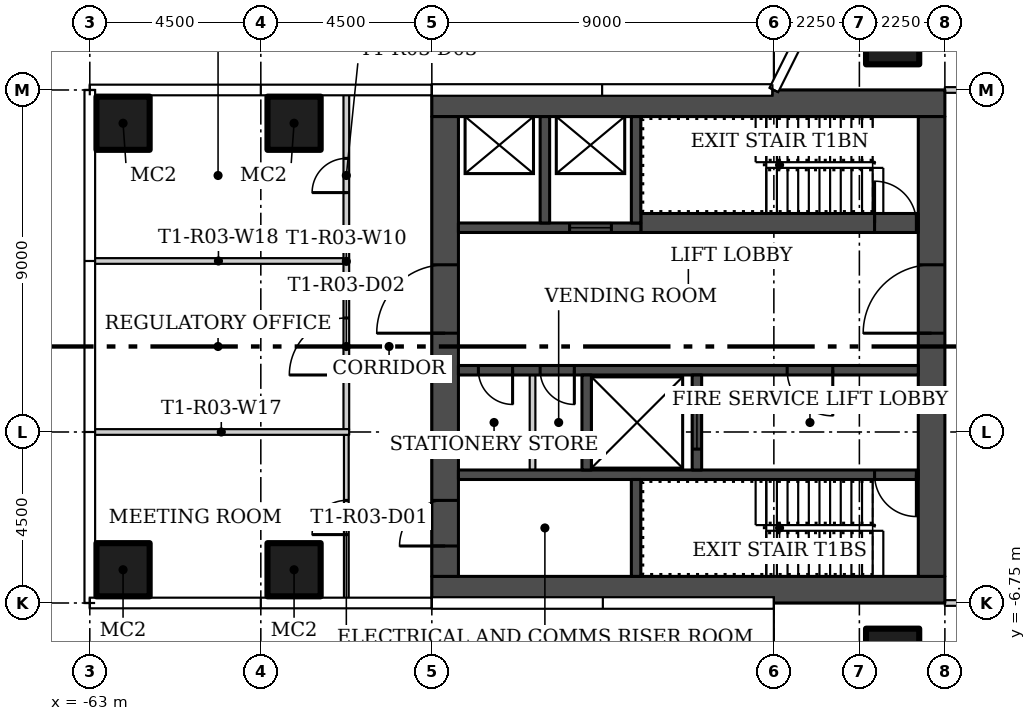
"""IFC4 building model, lengths in metres.
Left out: names, types, materials, properties, quantities, classifications, styles, units other than length and angle.
Written with IfcOpenShell. Run it as: python <this file> out.ifc"""

import sys

from ifc_helpers import new_model, si_unit, direction, frame, frame_2d, origin, origin_2d, place, context, subcontext, project, spatial, rectangle, hollow_rectangle, extrude, element, fill, save


model = new_model("IFC4")
c1 = context("Model", 3, precision=1e-05, world=origin(), true_north=direction((0.0, 1.0)))
c2 = subcontext(c1, "Body", "Model", "MODEL_VIEW")
j1 = project(units=[si_unit("LENGTHUNIT", "METRE"), si_unit("PLANEANGLEUNIT", "RADIAN")], contexts=[c1])
p1 = place(None, origin())
s1 = spatial("IfcSite", under=j1, at=p1, CompositionType="ELEMENT")
p2 = place(p1, origin())
s2 = spatial("IfcBuilding", under=s1, at=p2, CompositionType="ELEMENT")
p3 = place(p2, frame((0.0, 0.0, 42.0)))
s3 = spatial("IfcBuildingStorey", under=s2, at=p3, CompositionType="ELEMENT", Elevation=42.0)
for number, where in (
    (1, (-41.875, 8.125, 0.0)),
    (2, (-41.875, -8.125, 0.0)),
    (3, (-57.625, -5.875, 0.0)),
    (4, (-62.125, -5.875, 0.0)),
    (5, (-57.625, 5.875, 0.0)),
    (6, (-62.125, 5.875, 0.0)),
):
    element("IfcColumn", number, at=place(p3, frame(where)), inside=s3, PredefinedType="COLUMN", context=c2, shape_type="SweptSolid", body=[
        extrude(hollow_rectangle(XDim=1.4, YDim=1.4, WallThickness=0.05, at=origin_2d()), origin(), (0.0, 0.0, 1.0), 3.55),
    ])
p4 = place(p3, frame((-40.5, 6.75, 0.0)))
e7 = element("IfcWall", 7, at=p4, inside=s3, PredefinedType="PARTITIONING", context=c2, shape_type="SweptSolid", body=[
    extrude(rectangle(XDim=13.5, YDim=0.15, at=frame_2d((6.75, 0.0))), origin(), (0.0, 0.0, 1.0), 3.55),
])
p5 = place(p4, frame((3.75, 0.0, 0.0)))
e8 = element("IfcOpeningElement", 8, at=p5, cuts=e7, PredefinedType="OPENING", context=c2, shape_type="SweptSolid", body=[
    extrude(rectangle(XDim=1.5, YDim=2.1, at=frame_2d((0.75, 1.05))), frame((0.0, 0.085, 0.0), z_axis=(0.0, -1.0, 0.0), x_axis=(1.0, 0.0, 0.0)), (0.0, 0.0, 1.0), 0.17),
])
p6 = place(p4, frame((10.5, 0.0, 0.0)))
e9 = element("IfcOpeningElement", 9, at=p6, cuts=e7, PredefinedType="OPENING", context=c2, shape_type="SweptSolid", body=[
    extrude(rectangle(XDim=1.5, YDim=2.1, at=frame_2d((0.75, 1.05))), frame((0.0, 0.085, 0.0), z_axis=(0.0, -1.0, 0.0), x_axis=(1.0, 0.0, 0.0)), (0.0, 0.0, 1.0), 0.17),
])
p7 = place(p3, frame((-27.0, -6.75, 0.0), z_axis=(0.0, 0.0, 1.0), x_axis=(-1.0, 0.0, 0.0)))
e10 = element("IfcWall", 10, at=p7, inside=s3, PredefinedType="PARTITIONING", context=c2, shape_type="SweptSolid", body=[
    extrude(rectangle(XDim=13.5, YDim=0.15, at=frame_2d((6.75, 0.0))), origin(), (0.0, 0.0, 1.0), 3.55),
])
p8 = place(p7, frame((1.5, 0.0, 0.0)))
e11 = element("IfcOpeningElement", 11, at=p8, cuts=e10, PredefinedType="OPENING", context=c2, shape_type="SweptSolid", body=[
    extrude(rectangle(XDim=1.5, YDim=2.1, at=frame_2d((0.75, 1.05))), frame((0.0, 0.085, 0.0), z_axis=(0.0, -1.0, 0.0), x_axis=(1.0, 0.0, 0.0)), (0.0, 0.0, 1.0), 0.17),
])
p9 = place(p7, frame((6.0, 0.0, 0.0)))
e12 = element("IfcOpeningElement", 12, at=p9, cuts=e10, PredefinedType="OPENING", context=c2, shape_type="SweptSolid", body=[
    extrude(rectangle(XDim=1.5, YDim=2.1, at=frame_2d((0.75, 1.05))), frame((0.0, 0.085, 0.0), z_axis=(0.0, -1.0, 0.0), x_axis=(1.0, 0.0, 0.0)), (0.0, 0.0, 1.0), 0.17),
])
p10 = place(p7, frame((10.5, 0.0, 0.0)))
e13 = element("IfcOpeningElement", 13, at=p10, cuts=e10, PredefinedType="OPENING", context=c2, shape_type="SweptSolid", body=[
    extrude(rectangle(XDim=1.5, YDim=2.1, at=frame_2d((0.75, 1.05))), frame((0.0, 0.085, 0.0), z_axis=(0.0, -1.0, 0.0), x_axis=(1.0, 0.0, 0.0)), (0.0, 0.0, 1.0), 0.17),
])
p11 = place(p3, frame((-56.25, -6.655, 0.0), z_axis=(0.0, 0.0, 1.0), x_axis=(0.0, 1.0, 0.0)))
e14 = element("IfcWall", 14, at=p11, inside=s3, PredefinedType="PARTITIONING", context=c2, shape_type="SweptSolid", body=[
    extrude(rectangle(XDim=4.33, YDim=0.125, at=frame_2d((2.165, 0.0))), origin(), (0.0, 0.0, 1.0), 3.55),
])
p12 = place(p11, frame((1.705, 0.0, 0.0)))
e15 = element("IfcOpeningElement", 15, at=p12, cuts=e14, PredefinedType="OPENING", context=c2, shape_type="SweptSolid", body=[
    extrude(rectangle(XDim=0.9, YDim=2.1, at=frame_2d((0.45, 1.05))), frame((0.0, 0.073, 0.0), z_axis=(0.0, -1.0, 0.0), x_axis=(1.0, 0.0, 0.0)), (0.0, 0.0, 1.0), 0.145),
])
p13 = place(p3, frame((-56.25, -2.175, 0.0), z_axis=(0.0, 0.0, 1.0), x_axis=(0.0, 1.0, 0.0)))
e16 = element("IfcWall", 16, at=p13, inside=s3, PredefinedType="PARTITIONING", context=c2, shape_type="SweptSolid", body=[
    extrude(rectangle(XDim=8.83, YDim=0.15, at=frame_2d((4.415, 0.0))), origin(), (0.0, 0.0, 1.0), 3.55),
])
p14 = place(p13, frame((1.425, 0.0, 0.0)))
e17 = element("IfcOpeningElement", 17, at=p14, cuts=e16, PredefinedType="OPENING", context=c2, shape_type="SweptSolid", body=[
    extrude(rectangle(XDim=1.5, YDim=2.1, at=frame_2d((0.75, 1.05))), frame((0.0, 0.085, 0.0), z_axis=(0.0, -1.0, 0.0), x_axis=(1.0, 0.0, 0.0)), (0.0, 0.0, 1.0), 0.17),
])
p15 = place(p13, frame((6.225, 0.0, 0.0)))
e18 = element("IfcOpeningElement", 18, at=p15, cuts=e16, PredefinedType="OPENING", context=c2, shape_type="SweptSolid", body=[
    extrude(rectangle(XDim=0.9, YDim=2.1, at=frame_2d((0.45, 1.05))), frame((0.0, 0.085, 0.0), z_axis=(0.0, -1.0, 0.0), x_axis=(1.0, 0.0, 0.0)), (0.0, 0.0, 1.0), 0.17),
])
p16 = place(p3, frame((-56.175, -2.25, 0.0), z_axis=(0.0, 0.0, 1.0), x_axis=(-1.0, 0.0, 0.0)))
e19 = element("IfcWall", 19, at=p16, inside=s3, PredefinedType="PARTITIONING", context=c2, shape_type="SweptSolid", body=[
    extrude(rectangle(XDim=6.73, YDim=0.15, at=frame_2d((3.365, 0.0))), origin(), (0.0, 0.0, 1.0), 3.55),
])
p17 = place(p3, frame((-56.325, 2.25, 0.0), z_axis=(0.0, 0.0, 1.0), x_axis=(-1.0, 0.0, 0.0)))
e20 = element("IfcWall", 20, at=p17, inside=s3, PredefinedType="PARTITIONING", context=c2, shape_type="SweptSolid", body=[
    extrude(rectangle(XDim=6.58, YDim=0.15, at=frame_2d((3.29, 0.0))), origin(), (0.0, 0.0, 1.0), 3.55),
])
for number, where, z_axis, x_axis in (
    (21, (-40.5, -6.4, 0.0), (0.0, 0.0, 1.0), (-1.0, 0.0, 0.0)),
    (22, (-40.5, 6.4, 0.0), (0.0, 0.0, 1.0), (-1.0, 0.0, 0.0)),
):
    element("IfcWall", number, at=place(p3, frame(where, z_axis=z_axis, x_axis=x_axis)), inside=s3, PredefinedType="SHEAR", context=c2, shape_type="SweptSolid", body=[
        extrude(rectangle(XDim=13.5, YDim=0.7, at=frame_2d((6.75, 0.0))), origin(), (0.0, 0.0, 1.0), 3.55),
    ])
p18 = place(p3, frame((-40.85, -6.05, 0.0), z_axis=(0.0, 0.0, 1.0), x_axis=(0.0, 1.0, 0.0)))
e23 = element("IfcWall", 23, at=p18, inside=s3, PredefinedType="SHEAR", context=c2, shape_type="SweptSolid", body=[
    extrude(rectangle(XDim=12.1, YDim=0.7, at=frame_2d((6.05, 0.0))), origin(), (0.0, 0.0, 1.0), 3.55),
])
p19 = place(p18, frame((6.4, 0.0, 0.0)))
e24 = element("IfcOpeningElement", 24, at=p19, cuts=e23, PredefinedType="OPENING", context=c2, shape_type="SweptSolid", body=[
    extrude(rectangle(XDim=1.8, YDim=2.4, at=frame_2d((0.9, 1.2))), frame((0.0, 0.36, 0.0), z_axis=(0.0, -1.0, 0.0), x_axis=(1.0, 0.0, 0.0)), (0.0, 0.0, 1.0), 0.72),
])
p20 = place(p3, frame((-53.65, -6.05, 0.0), z_axis=(0.0, 0.0, 1.0), x_axis=(0.0, 1.0, 0.0)))
e25 = element("IfcWall", 25, at=p20, inside=s3, PredefinedType="SHEAR", context=c2, shape_type="SweptSolid", body=[
    extrude(rectangle(XDim=12.1, YDim=0.7, at=frame_2d((6.05, 0.0))), origin(), (0.0, 0.0, 1.0), 3.55),
])
p21 = place(p20, frame((0.8, 0.0, 0.0)))
e26 = element("IfcOpeningElement", 26, at=p21, cuts=e25, PredefinedType="OPENING", context=c2, shape_type="SweptSolid", body=[
    extrude(rectangle(XDim=1.2, YDim=2.1, at=frame_2d((0.6, 1.05))), frame((0.0, 0.36, 0.0), z_axis=(0.0, -1.0, 0.0), x_axis=(1.0, 0.0, 0.0)), (0.0, 0.0, 1.0), 0.72),
])
p22 = place(p20, frame((6.4, 0.0, 0.0)))
e27 = element("IfcOpeningElement", 27, at=p22, cuts=e25, PredefinedType="OPENING", context=c2, shape_type="SweptSolid", body=[
    extrude(rectangle(XDim=1.8, YDim=2.4, at=frame_2d((0.9, 1.2))), frame((0.0, 0.36, 0.0), z_axis=(0.0, -1.0, 0.0), x_axis=(1.0, 0.0, 0.0)), (0.0, 0.0, 1.0), 0.72),
])
p23 = place(p3, frame((-41.2, -3.375, 0.0), z_axis=(0.0, 0.0, 1.0), x_axis=(-1.0, 0.0, 0.0)))
e28 = element("IfcWall", 28, at=p23, inside=s3, PredefinedType="SHEAR", context=c2, shape_type="SweptSolid", body=[
    extrude(rectangle(XDim=12.1, YDim=0.25, at=frame_2d((6.05, 0.0))), origin(), (0.0, 0.0, 1.0), 3.55),
])
p24 = place(p23, frame((0.05, 0.0, 0.0)))
e29 = element("IfcOpeningElement", 29, at=p24, cuts=e28, PredefinedType="OPENING", context=c2, shape_type="SweptSolid", body=[
    extrude(rectangle(XDim=1.1, YDim=2.1, at=frame_2d((0.55, 1.05))), frame((0.0, 0.135, 0.0), z_axis=(0.0, -1.0, 0.0), x_axis=(1.0, 0.0, 0.0)), (0.0, 0.0, 1.0), 0.27),
])
p25 = place(p3, frame((-48.625, -6.05, 0.0), z_axis=(0.0, 0.0, 1.0), x_axis=(0.0, 1.0, 0.0)))
e30 = element("IfcWall", 30, at=p25, inside=s3, PredefinedType="SHEAR", context=c2, shape_type="SweptSolid", body=[
    extrude(rectangle(XDim=2.55, YDim=0.25, at=frame_2d((1.275, 0.0))), origin(), (0.0, 0.0, 1.0), 3.55),
])
p26 = place(p3, frame((-41.2, -0.625, 0.0), z_axis=(0.0, 0.0, 1.0), x_axis=(-1.0, 0.0, 0.0)))
e31 = element("IfcWall", 31, at=p26, inside=s3, PredefinedType="SHEAR", context=c2, shape_type="SweptSolid", body=[
    extrude(rectangle(XDim=12.1, YDim=0.25, at=frame_2d((6.05, 0.0))), origin(), (0.0, 0.0, 1.0), 3.55),
])
p27 = place(p26, frame((2.25, 0.0, 0.0)))
e32 = element("IfcOpeningElement", 32, at=p27, cuts=e31, PredefinedType="OPENING", context=c2, shape_type="SweptSolid", body=[
    extrude(rectangle(XDim=1.2, YDim=2.1, at=frame_2d((0.6, 1.05))), frame((0.0, 0.135, 0.0), z_axis=(0.0, -1.0, 0.0), x_axis=(1.0, 0.0, 0.0)), (0.0, 0.0, 1.0), 0.27),
])
p28 = place(p26, frame((9.05, 0.0, 0.0)))
e33 = element("IfcOpeningElement", 33, at=p28, cuts=e31, PredefinedType="OPENING", context=c2, shape_type="SweptSolid", body=[
    extrude(rectangle(XDim=0.9, YDim=2.1, at=frame_2d((0.45, 1.05))), frame((0.0, 0.135, 0.0), z_axis=(0.0, -1.0, 0.0), x_axis=(1.0, 0.0, 0.0)), (0.0, 0.0, 1.0), 0.27),
])
p29 = place(p26, frame((10.675, 0.0, 0.0)))
e34 = element("IfcOpeningElement", 34, at=p29, cuts=e31, PredefinedType="OPENING", context=c2, shape_type="SweptSolid", body=[
    extrude(rectangle(XDim=0.9, YDim=2.1, at=frame_2d((0.45, 1.05))), frame((0.0, 0.135, 0.0), z_axis=(0.0, -1.0, 0.0), x_axis=(1.0, 0.0, 0.0)), (0.0, 0.0, 1.0), 0.27),
])
p30 = place(p3, frame((-47.025, -3.25, 0.0), z_axis=(0.0, 0.0, 1.0), x_axis=(0.0, 1.0, 0.0)))
e35 = element("IfcWall", 35, at=p30, inside=s3, PredefinedType="SHEAR", context=c2, shape_type="SweptSolid", body=[
    extrude(rectangle(XDim=2.5, YDim=0.25, at=frame_2d((1.25, 0.0))), origin(), (0.0, 0.0, 1.0), 3.55),
])
p31 = place(p30, frame((0.55, 0.0, 0.0)))
e36 = element("IfcOpeningElement", 36, at=p31, cuts=e35, PredefinedType="OPENING", context=c2, shape_type="SweptSolid", body=[
    extrude(rectangle(XDim=1.4, YDim=2.4, at=frame_2d((0.7, 1.2))), frame((0.0, 0.135, 0.0), z_axis=(0.0, -1.0, 0.0), x_axis=(1.0, 0.0, 0.0)), (0.0, 0.0, 1.0), 0.27),
])
p32 = place(p3, frame((-49.925, -3.25, 0.0), z_axis=(0.0, 0.0, 1.0), x_axis=(0.0, 1.0, 0.0)))
e37 = element("IfcWall", 37, at=p32, inside=s3, PredefinedType="SHEAR", context=c2, shape_type="SweptSolid", body=[
    extrude(rectangle(XDim=2.5, YDim=0.25, at=frame_2d((1.25, 0.0))), origin(), (0.0, 0.0, 1.0), 3.55),
])
p33 = place(p3, frame((-51.35, -3.25, 0.0), z_axis=(0.0, 0.0, 1.0), x_axis=(0.0, 1.0, 0.0)))
e38 = element("IfcWall", 38, at=p33, inside=s3, PredefinedType="PARTITIONING", context=c2, shape_type="SweptSolid", body=[
    extrude(rectangle(XDim=2.5, YDim=0.15, at=frame_2d((1.25, 0.0))), origin(), (0.0, 0.0, 1.0), 3.55),
])
p34 = place(p3, frame((-48.5, 3.25, 0.0)))
e39 = element("IfcWall", 39, at=p34, inside=s3, PredefinedType="SHEAR", context=c2, shape_type="SweptSolid", body=[
    extrude(rectangle(XDim=7.3, YDim=0.5, at=frame_2d((3.65, 0.0))), origin(), (0.0, 0.0, 1.0), 3.55),
])
p35 = place(p34, frame((6.15, 0.0, 0.0)))
e40 = element("IfcOpeningElement", 40, at=p35, cuts=e39, PredefinedType="OPENING", context=c2, shape_type="SweptSolid", body=[
    extrude(rectangle(XDim=1.1, YDim=2.1, at=frame_2d((0.55, 1.05))), frame((0.0, 0.26, 0.0), z_axis=(0.0, -1.0, 0.0), x_axis=(1.0, 0.0, 0.0)), (0.0, 0.0, 1.0), 0.52),
])
p36 = place(p3, frame((-48.5, 3.125, 0.0), z_axis=(0.0, 0.0, 1.0), x_axis=(-1.0, 0.0, 0.0)))
e41 = element("IfcWall", 41, at=p36, inside=s3, PredefinedType="SHEAR", context=c2, shape_type="SweptSolid", body=[
    extrude(rectangle(XDim=4.8, YDim=0.25, at=frame_2d((2.4, 0.0))), origin(), (0.0, 0.0, 1.0), 3.55),
])
p37 = place(p36, frame((0.775, 0.0, 0.0)))
e42 = element("IfcOpeningElement", 42, at=p37, cuts=e41, PredefinedType="OPENING", context=c2, shape_type="SweptSolid", body=[
    extrude(rectangle(XDim=1.1, YDim=2.1, at=frame_2d((0.55, 1.05))), frame((0.0, 0.135, 0.0), z_axis=(0.0, -1.0, 0.0), x_axis=(1.0, 0.0, 0.0)), (0.0, 0.0, 1.0), 0.27),
])
for number, where, z_axis, x_axis in (
    (43, (-48.625, 3.25, 0.0), (0.0, 0.0, 1.0), (0.0, 1.0, 0.0)),
    (44, (-51.025, 3.25, 0.0), (0.0, 0.0, 1.0), (0.0, 1.0, 0.0)),
):
    element("IfcWall", number, at=place(p3, frame(where, z_axis=z_axis, x_axis=x_axis)), inside=s3, PredefinedType="SHEAR", context=c2, shape_type="SweptSolid", body=[
        extrude(rectangle(XDim=2.8, YDim=0.25, at=frame_2d((1.4, 0.0))), origin(), (0.0, 0.0, 1.0), 3.55),
    ])
p38 = place(p12, origin())
e45 = element("IfcDoor", 45, at=p38, inside=s3, OperationType="SINGLE_SWING_LEFT", PredefinedType="DOOR", context=c2, shape_type="SweptSolid", body=[
    extrude(rectangle(XDim=0.9, YDim=2.1, at=frame_2d((0.45, 1.05))), frame((0.0, 0.025, 0.0), z_axis=(0.0, -1.0, 0.0), x_axis=(1.0, 0.0, 0.0)), (0.0, 0.0, 1.0), 0.05),
])
fill(e15, e45)
p39 = place(p14, origin())
e46 = element("IfcDoor", 46, at=p39, inside=s3, OperationType="DOUBLE_DOOR_SINGLE_SWING", PredefinedType="DOOR", context=c2, shape_type="SweptSolid", body=[
    extrude(rectangle(XDim=1.5, YDim=2.1, at=frame_2d((0.75, 1.05))), frame((0.0, 0.025, 0.0), z_axis=(0.0, -1.0, 0.0), x_axis=(1.0, 0.0, 0.0)), (0.0, 0.0, 1.0), 0.05),
])
fill(e17, e46)
p40 = place(p15, origin())
e47 = element("IfcDoor", 47, at=p40, inside=s3, OperationType="SINGLE_SWING_LEFT", PredefinedType="DOOR", context=c2, shape_type="SweptSolid", body=[
    extrude(rectangle(XDim=0.9, YDim=2.1, at=frame_2d((0.45, 1.05))), frame((0.0, 0.025, 0.0), z_axis=(0.0, -1.0, 0.0), x_axis=(1.0, 0.0, 0.0)), (0.0, 0.0, 1.0), 0.05),
])
fill(e18, e47)
p41 = place(p19, origin())
e48 = element("IfcDoor", 48, at=p41, inside=s3, OperationType="DOUBLE_DOOR_SINGLE_SWING", PredefinedType="DOOR", context=c2, shape_type="SweptSolid", body=[
    extrude(rectangle(XDim=1.8, YDim=2.4, at=frame_2d((0.9, 1.2))), frame((0.0, 0.025, 0.0), z_axis=(0.0, -1.0, 0.0), x_axis=(1.0, 0.0, 0.0)), (0.0, 0.0, 1.0), 0.05),
])
fill(e24, e48)
p42 = place(p21, origin())
e49 = element("IfcDoor", 49, at=p42, inside=s3, OperationType="SINGLE_SWING_LEFT", PredefinedType="DOOR", context=c2, shape_type="SweptSolid", body=[
    extrude(rectangle(XDim=1.2, YDim=2.1, at=frame_2d((0.6, 1.05))), frame((0.0, 0.025, 0.0), z_axis=(0.0, -1.0, 0.0), x_axis=(1.0, 0.0, 0.0)), (0.0, 0.0, 1.0), 0.05),
])
fill(e26, e49)
p43 = place(p22, origin())
e50 = element("IfcDoor", 50, at=p43, inside=s3, OperationType="DOUBLE_DOOR_SINGLE_SWING", PredefinedType="DOOR", context=c2, shape_type="SweptSolid", body=[
    extrude(rectangle(XDim=1.8, YDim=2.4, at=frame_2d((0.9, 1.2))), frame((0.0, 0.025, 0.0), z_axis=(0.0, -1.0, 0.0), x_axis=(1.0, 0.0, 0.0)), (0.0, 0.0, 1.0), 0.05),
])
fill(e27, e50)
p44 = place(p24, origin())
e51 = element("IfcDoor", 51, at=p44, inside=s3, OperationType="SINGLE_SWING_LEFT", PredefinedType="DOOR", context=c2, shape_type="SweptSolid", body=[
    extrude(rectangle(XDim=1.1, YDim=2.1, at=frame_2d((0.55, 1.05))), frame((0.0, 0.025, 0.0), z_axis=(0.0, -1.0, 0.0), x_axis=(1.0, 0.0, 0.0)), (0.0, 0.0, 1.0), 0.05),
])
fill(e29, e51)
p45 = place(p27, origin())
e52 = element("IfcDoor", 52, at=p45, inside=s3, OperationType="SINGLE_SWING_LEFT", PredefinedType="DOOR", context=c2, shape_type="SweptSolid", body=[
    extrude(rectangle(XDim=1.2, YDim=2.1, at=frame_2d((0.6, 1.05))), frame((0.0, 0.025, 0.0), z_axis=(0.0, -1.0, 0.0), x_axis=(1.0, 0.0, 0.0)), (0.0, 0.0, 1.0), 0.05),
])
fill(e32, e52)
p46 = place(p28, origin())
e53 = element("IfcDoor", 53, at=p46, inside=s3, OperationType="SINGLE_SWING_RIGHT", PredefinedType="DOOR", context=c2, shape_type="SweptSolid", body=[
    extrude(rectangle(XDim=0.9, YDim=2.1, at=frame_2d((0.45, 1.05))), frame((0.0, 0.025, 0.0), z_axis=(0.0, -1.0, 0.0), x_axis=(1.0, 0.0, 0.0)), (0.0, 0.0, 1.0), 0.05),
])
fill(e33, e53)
p47 = place(p29, origin())
e54 = element("IfcDoor", 54, at=p47, inside=s3, OperationType="SINGLE_SWING_RIGHT", PredefinedType="DOOR", context=c2, shape_type="SweptSolid", body=[
    extrude(rectangle(XDim=0.9, YDim=2.1, at=frame_2d((0.45, 1.05))), frame((0.0, 0.025, 0.0), z_axis=(0.0, -1.0, 0.0), x_axis=(1.0, 0.0, 0.0)), (0.0, 0.0, 1.0), 0.05),
])
fill(e34, e54)
p48 = place(p31, origin())
e55 = element("IfcDoor", 55, at=p48, inside=s3, OperationType="SLIDING_TO_LEFT", PredefinedType="DOOR", context=c2, shape_type="SweptSolid", body=[
    extrude(rectangle(XDim=1.4, YDim=2.4, at=frame_2d((0.7, 1.2))), frame((0.0, 0.025, 0.0), z_axis=(0.0, -1.0, 0.0), x_axis=(1.0, 0.0, 0.0)), (0.0, 0.0, 1.0), 0.05),
])
fill(e36, e55)
p49 = place(p35, origin())
e56 = element("IfcDoor", 56, at=p49, inside=s3, OperationType="SINGLE_SWING_RIGHT", PredefinedType="DOOR", context=c2, shape_type="SweptSolid", body=[
    extrude(rectangle(XDim=1.1, YDim=2.1, at=frame_2d((0.55, 1.05))), frame((0.0, 0.025, 0.0), z_axis=(0.0, -1.0, 0.0), x_axis=(1.0, 0.0, 0.0)), (0.0, 0.0, 1.0), 0.05),
])
fill(e40, e56)
p50 = place(p37, origin())
e57 = element("IfcDoor", 57, at=p50, inside=s3, OperationType="SLIDING_TO_LEFT", PredefinedType="DOOR", context=c2, shape_type="SweptSolid", body=[
    extrude(rectangle(XDim=1.1, YDim=2.1, at=frame_2d((0.55, 1.05))), frame((0.0, 0.025, 0.0), z_axis=(0.0, -1.0, 0.0), x_axis=(1.0, 0.0, 0.0)), (0.0, 0.0, 1.0), 0.05),
])
fill(e42, e57)
save(model, sys.argv[1])
